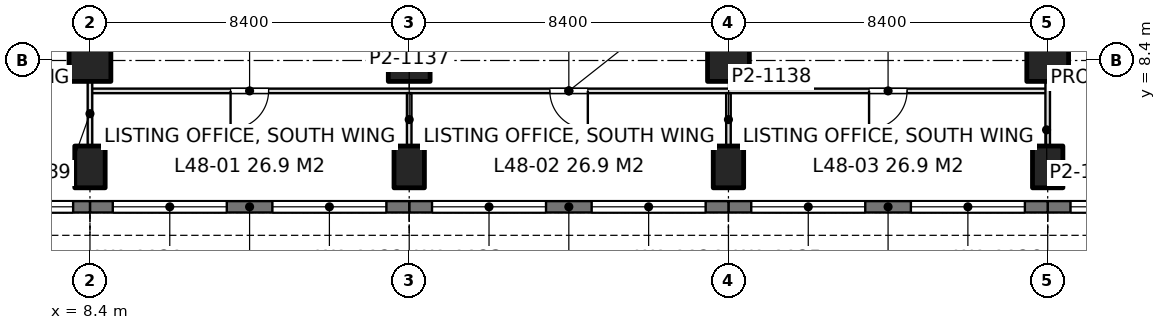
"""IFC4 building model, lengths in metres.
Left out: names, types, materials, properties, quantities, classifications, styles, units other than length and angle.
Written with IfcOpenShell. Run it as: python <this file> out.ifc"""

import sys

from ifc_helpers import new_model, si_unit, direction, frame, frame_2d, origin, origin_2d, place, context, subcontext, project, spatial, rectangle, extrude, element, fill, save


model = new_model("IFC4")
c1 = context("Model", 3, precision=1e-05, world=origin(), true_north=direction((0.0, 1.0)))
c2 = subcontext(c1, "Body", "Model", "MODEL_VIEW")
j1 = project(units=[si_unit("LENGTHUNIT", "METRE"), si_unit("PLANEANGLEUNIT", "RADIAN")], contexts=[c1])
p1 = place(None, origin())
s1 = spatial("IfcSite", under=j1, at=p1, CompositionType="ELEMENT")
p2 = place(p1, origin())
s2 = spatial("IfcBuilding", under=s1, at=p2, CompositionType="ELEMENT")
p3 = place(p2, frame((0.0, 0.0, 211.2)))
s3 = spatial("IfcBuildingStorey", under=s2, at=p3, CompositionType="ELEMENT", Elevation=211.2)
p4 = place(p3, frame((8.4, 5.6, 0.0), z_axis=(0.0, 0.0, 1.0), x_axis=(1.0, 0.0, 0.0)))
e1 = element("IfcColumn", 1, at=p4, inside=s3, PredefinedType="COLUMN", context=c2, shape_type="SweptSolid", body=[
    extrude(rectangle(XDim=0.8, YDim=1.1, at=origin_2d()), origin(), (0.0, 0.0, 1.0), 4.2),
])
p5 = place(p3, frame((8.4, 8.4, 0.0), z_axis=(0.0, 0.0, 1.0), x_axis=(1.0, 0.0, 0.0)))
e2 = element("IfcColumn", 2, at=p5, inside=s3, PredefinedType="COLUMN", context=c2, shape_type="SweptSolid", body=[
    extrude(rectangle(XDim=1.1, YDim=1.1, at=origin_2d()), origin(), (0.0, 0.0, 1.0), 4.2),
])
p6 = place(p3, frame((16.8, 5.6, 0.0), z_axis=(0.0, 0.0, 1.0), x_axis=(1.0, 0.0, 0.0)))
e3 = element("IfcColumn", 3, at=p6, inside=s3, PredefinedType="COLUMN", context=c2, shape_type="SweptSolid", body=[
    extrude(rectangle(XDim=0.8, YDim=1.1, at=origin_2d()), origin(), (0.0, 0.0, 1.0), 4.2),
])
p7 = place(p3, frame((16.8, 8.4, 0.0), z_axis=(0.0, 0.0, 1.0), x_axis=(1.0, 0.0, 0.0)))
e4 = element("IfcColumn", 4, at=p7, inside=s3, PredefinedType="COLUMN", context=c2, shape_type="SweptSolid", body=[
    extrude(rectangle(XDim=1.1, YDim=1.1, at=origin_2d()), origin(), (0.0, 0.0, 1.0), 4.2),
])
p8 = place(p3, frame((25.2, 5.6, 0.0), z_axis=(0.0, 0.0, 1.0), x_axis=(1.0, 0.0, 0.0)))
e5 = element("IfcColumn", 5, at=p8, inside=s3, PredefinedType="COLUMN", context=c2, shape_type="SweptSolid", body=[
    extrude(rectangle(XDim=0.8, YDim=1.1, at=origin_2d()), origin(), (0.0, 0.0, 1.0), 4.2),
])
p9 = place(p3, frame((25.2, 8.4, 0.0), z_axis=(0.0, 0.0, 1.0), x_axis=(1.0, 0.0, 0.0)))
e6 = element("IfcColumn", 6, at=p9, inside=s3, PredefinedType="COLUMN", context=c2, shape_type="SweptSolid", body=[
    extrude(rectangle(XDim=1.1, YDim=1.1, at=origin_2d()), origin(), (0.0, 0.0, 1.0), 4.2),
])
p10 = place(p3, frame((33.6, 5.6, 0.0), z_axis=(0.0, 0.0, 1.0), x_axis=(1.0, 0.0, 0.0)))
e7 = element("IfcColumn", 7, at=p10, inside=s3, PredefinedType="COLUMN", context=c2, shape_type="SweptSolid", body=[
    extrude(rectangle(XDim=0.8, YDim=1.1, at=origin_2d()), origin(), (0.0, 0.0, 1.0), 4.2),
])
p11 = place(p3, frame((33.6, 8.4, 0.0), z_axis=(0.0, 0.0, 1.0), x_axis=(1.0, 0.0, 0.0)))
e8 = element("IfcColumn", 8, at=p11, inside=s3, PredefinedType="COLUMN", context=c2, shape_type="SweptSolid", body=[
    extrude(rectangle(XDim=1.1, YDim=1.1, at=origin_2d()), origin(), (0.0, 0.0, 1.0), 4.2),
])
p12 = place(p3, frame((42.0, 4.55, 0.0), z_axis=(0.0, 0.0, 1.0), x_axis=(-1.0, 0.0, 0.0)))
e9 = element("IfcWall", 9, at=p12, inside=s3, PredefinedType="SOLIDWALL", context=c2, shape_type="SweptSolid", body=[
    extrude(rectangle(XDim=8.4, YDim=0.3, at=frame_2d((4.2, 0.0))), origin(), (0.0, 0.0, 1.0), 4.05),
])
p13 = place(p12, frame((0.6, 0.0, 0.9)))
e10 = element("IfcOpeningElement", 10, at=p13, cuts=e9, PredefinedType="OPENING", context=c2, shape_type="SweptSolid", body=[
    extrude(rectangle(XDim=3.0, YDim=1.9, at=frame_2d((1.5, 0.95))), frame((0.0, 0.16, 0.0), z_axis=(0.0, -1.0, 0.0), x_axis=(1.0, 0.0, 0.0)), (0.0, 0.0, 1.0), 0.32),
])
p14 = place(p12, frame((4.8, 0.0, 0.9)))
e11 = element("IfcOpeningElement", 11, at=p14, cuts=e9, PredefinedType="OPENING", context=c2, shape_type="SweptSolid", body=[
    extrude(rectangle(XDim=3.0, YDim=1.9, at=frame_2d((1.5, 0.95))), frame((0.0, 0.16, 0.0), z_axis=(0.0, -1.0, 0.0), x_axis=(1.0, 0.0, 0.0)), (0.0, 0.0, 1.0), 0.32),
])
p15 = place(p3, frame((33.6, 4.55, 0.0), z_axis=(0.0, 0.0, 1.0), x_axis=(-1.0, 0.0, 0.0)))
e12 = element("IfcWall", 12, at=p15, inside=s3, PredefinedType="SOLIDWALL", context=c2, shape_type="SweptSolid", body=[
    extrude(rectangle(XDim=8.4, YDim=0.3, at=frame_2d((4.2, 0.0))), origin(), (0.0, 0.0, 1.0), 4.05),
])
p16 = place(p15, frame((0.6, 0.0, 0.9)))
e13 = element("IfcOpeningElement", 13, at=p16, cuts=e12, PredefinedType="OPENING", context=c2, shape_type="SweptSolid", body=[
    extrude(rectangle(XDim=3.0, YDim=1.9, at=frame_2d((1.5, 0.95))), frame((0.0, 0.16, 0.0), z_axis=(0.0, -1.0, 0.0), x_axis=(1.0, 0.0, 0.0)), (0.0, 0.0, 1.0), 0.32),
])
p17 = place(p15, frame((4.8, 0.0, 0.9)))
e14 = element("IfcOpeningElement", 14, at=p17, cuts=e12, PredefinedType="OPENING", context=c2, shape_type="SweptSolid", body=[
    extrude(rectangle(XDim=3.0, YDim=1.9, at=frame_2d((1.5, 0.95))), frame((0.0, 0.16, 0.0), z_axis=(0.0, -1.0, 0.0), x_axis=(1.0, 0.0, 0.0)), (0.0, 0.0, 1.0), 0.32),
])
p18 = place(p3, frame((25.2, 4.55, 0.0), z_axis=(0.0, 0.0, 1.0), x_axis=(-1.0, 0.0, 0.0)))
e15 = element("IfcWall", 15, at=p18, inside=s3, PredefinedType="SOLIDWALL", context=c2, shape_type="SweptSolid", body=[
    extrude(rectangle(XDim=8.4, YDim=0.3, at=frame_2d((4.2, 0.0))), origin(), (0.0, 0.0, 1.0), 4.05),
])
p19 = place(p18, frame((0.6, 0.0, 0.9)))
e16 = element("IfcOpeningElement", 16, at=p19, cuts=e15, PredefinedType="OPENING", context=c2, shape_type="SweptSolid", body=[
    extrude(rectangle(XDim=3.0, YDim=1.9, at=frame_2d((1.5, 0.95))), frame((0.0, 0.16, 0.0), z_axis=(0.0, -1.0, 0.0), x_axis=(1.0, 0.0, 0.0)), (0.0, 0.0, 1.0), 0.32),
])
p20 = place(p18, frame((4.8, 0.0, 0.9)))
e17 = element("IfcOpeningElement", 17, at=p20, cuts=e15, PredefinedType="OPENING", context=c2, shape_type="SweptSolid", body=[
    extrude(rectangle(XDim=3.0, YDim=1.9, at=frame_2d((1.5, 0.95))), frame((0.0, 0.16, 0.0), z_axis=(0.0, -1.0, 0.0), x_axis=(1.0, 0.0, 0.0)), (0.0, 0.0, 1.0), 0.32),
])
p21 = place(p3, frame((16.8, 4.55, 0.0), z_axis=(0.0, 0.0, 1.0), x_axis=(-1.0, 0.0, 0.0)))
e18 = element("IfcWall", 18, at=p21, inside=s3, PredefinedType="SOLIDWALL", context=c2, shape_type="SweptSolid", body=[
    extrude(rectangle(XDim=8.4, YDim=0.3, at=frame_2d((4.2, 0.0))), origin(), (0.0, 0.0, 1.0), 4.05),
])
p22 = place(p21, frame((0.6, 0.0, 0.9)))
e19 = element("IfcOpeningElement", 19, at=p22, cuts=e18, PredefinedType="OPENING", context=c2, shape_type="SweptSolid", body=[
    extrude(rectangle(XDim=3.0, YDim=1.9, at=frame_2d((1.5, 0.95))), frame((0.0, 0.16, 0.0), z_axis=(0.0, -1.0, 0.0), x_axis=(1.0, 0.0, 0.0)), (0.0, 0.0, 1.0), 0.32),
])
p23 = place(p21, frame((4.8, 0.0, 0.9)))
e20 = element("IfcOpeningElement", 20, at=p23, cuts=e18, PredefinedType="OPENING", context=c2, shape_type="SweptSolid", body=[
    extrude(rectangle(XDim=3.0, YDim=1.9, at=frame_2d((1.5, 0.95))), frame((0.0, 0.16, 0.0), z_axis=(0.0, -1.0, 0.0), x_axis=(1.0, 0.0, 0.0)), (0.0, 0.0, 1.0), 0.32),
])
p24 = place(p3, frame((8.4, 4.55, 0.0), z_axis=(0.0, 0.0, 1.0), x_axis=(-1.0, 0.0, 0.0)))
e21 = element("IfcWall", 21, at=p24, inside=s3, PredefinedType="SOLIDWALL", context=c2, shape_type="SweptSolid", body=[
    extrude(rectangle(XDim=8.085, YDim=0.3, at=frame_2d((4.042, 0.0))), origin(), (0.0, 0.0, 1.0), 4.05),
])
p25 = place(p24, frame((0.443, 0.0, 0.9)))
e22 = element("IfcOpeningElement", 22, at=p25, cuts=e21, PredefinedType="OPENING", context=c2, shape_type="SweptSolid", body=[
    extrude(rectangle(XDim=3.0, YDim=1.9, at=frame_2d((1.5, 0.95))), frame((0.0, 0.16, 0.0), z_axis=(0.0, -1.0, 0.0), x_axis=(1.0, 0.0, 0.0)), (0.0, 0.0, 1.0), 0.32),
])
p26 = place(p24, frame((4.643, 0.0, 0.9)))
e23 = element("IfcOpeningElement", 23, at=p26, cuts=e21, PredefinedType="OPENING", context=c2, shape_type="SweptSolid", body=[
    extrude(rectangle(XDim=3.0, YDim=1.9, at=frame_2d((1.5, 0.95))), frame((0.0, 0.16, 0.0), z_axis=(0.0, -1.0, 0.0), x_axis=(1.0, 0.0, 0.0)), (0.0, 0.0, 1.0), 0.32),
])
p27 = place(p3, frame((8.4, 7.6, 0.0), z_axis=(0.0, 0.0, 1.0), x_axis=(1.0, 0.0, 0.0)))
e24 = element("IfcWall", 24, at=p27, inside=s3, PredefinedType="PARTITIONING", context=c2, shape_type="SweptSolid", body=[
    extrude(rectangle(XDim=25.2, YDim=0.12, at=frame_2d((12.6, 0.0))), origin(), (0.0, 0.0, 1.0), 3.69),
])
p28 = place(p27, frame((3.7, 0.0, 0.0)))
e25 = element("IfcOpeningElement", 25, at=p28, cuts=e24, PredefinedType="OPENING", context=c2, shape_type="SweptSolid", body=[
    extrude(rectangle(XDim=1.0, YDim=2.4, at=frame_2d((0.5, 1.2))), frame((0.0, 0.07, 0.0), z_axis=(0.0, -1.0, 0.0), x_axis=(1.0, 0.0, 0.0)), (0.0, 0.0, 1.0), 0.14),
])
p29 = place(p27, frame((12.1, 0.0, 0.0)))
e26 = element("IfcOpeningElement", 26, at=p29, cuts=e24, PredefinedType="OPENING", context=c2, shape_type="SweptSolid", body=[
    extrude(rectangle(XDim=1.0, YDim=2.4, at=frame_2d((0.5, 1.2))), frame((0.0, 0.07, 0.0), z_axis=(0.0, -1.0, 0.0), x_axis=(1.0, 0.0, 0.0)), (0.0, 0.0, 1.0), 0.14),
])
p30 = place(p27, frame((20.5, 0.0, 0.0)))
e27 = element("IfcOpeningElement", 27, at=p30, cuts=e24, PredefinedType="OPENING", context=c2, shape_type="SweptSolid", body=[
    extrude(rectangle(XDim=1.0, YDim=2.4, at=frame_2d((0.5, 1.2))), frame((0.0, 0.07, 0.0), z_axis=(0.0, -1.0, 0.0), x_axis=(1.0, 0.0, 0.0)), (0.0, 0.0, 1.0), 0.14),
])
p31 = place(p3, frame((8.4, 6.149, 0.0), z_axis=(0.0, 0.0, 1.0), x_axis=(0.0, 1.0, 0.0)))
e28 = element("IfcWall", 28, at=p31, inside=s3, PredefinedType="PARTITIONING", context=c2, shape_type="SweptSolid", body=[
    extrude(rectangle(XDim=1.703, YDim=0.12, at=frame_2d((0.852, 0.0))), origin(), (0.0, 0.0, 1.0), 3.69),
])
for number, where, z_axis, x_axis in (
    (29, (16.8, 6.149, 0.0), (0.0, 0.0, 1.0), (0.0, 1.0, 0.0)),
    (30, (25.2, 6.149, 0.0), (0.0, 0.0, 1.0), (0.0, 1.0, 0.0)),
):
    element("IfcWall", number, at=place(p3, frame(where, z_axis=z_axis, x_axis=x_axis)), inside=s3, PredefinedType="PARTITIONING", context=c2, shape_type="SweptSolid", body=[
        extrude(rectangle(XDim=1.393, YDim=0.12, at=frame_2d((0.697, 0.0))), origin(), (0.0, 0.0, 1.0), 3.69),
    ])
p32 = place(p3, frame((33.6, 6.149, 0.0), z_axis=(0.0, 0.0, 1.0), x_axis=(0.0, 1.0, 0.0)))
e31 = element("IfcWall", 31, at=p32, inside=s3, PredefinedType="PARTITIONING", context=c2, shape_type="SweptSolid", body=[
    extrude(rectangle(XDim=1.703, YDim=0.12, at=frame_2d((0.852, 0.0))), origin(), (0.0, 0.0, 1.0), 3.69),
])
p33 = place(p14, origin())
e32 = element("IfcWindow", 32, at=p33, inside=s3, PartitioningType="SINGLE_PANEL", PredefinedType="WINDOW", context=c2, shape_type="SweptSolid", body=[
    extrude(rectangle(XDim=3.0, YDim=1.9, at=frame_2d((1.5, 0.95))), frame((0.0, 0.03, 0.0), z_axis=(0.0, -1.0, 0.0), x_axis=(1.0, 0.0, 0.0)), (0.0, 0.0, 1.0), 0.06),
])
fill(e11, e32)
p34 = place(p16, origin())
e33 = element("IfcWindow", 33, at=p34, inside=s3, PartitioningType="SINGLE_PANEL", PredefinedType="WINDOW", context=c2, shape_type="SweptSolid", body=[
    extrude(rectangle(XDim=3.0, YDim=1.9, at=frame_2d((1.5, 0.95))), frame((0.0, 0.03, 0.0), z_axis=(0.0, -1.0, 0.0), x_axis=(1.0, 0.0, 0.0)), (0.0, 0.0, 1.0), 0.06),
])
fill(e13, e33)
p35 = place(p17, origin())
e34 = element("IfcWindow", 34, at=p35, inside=s3, PartitioningType="SINGLE_PANEL", PredefinedType="WINDOW", context=c2, shape_type="SweptSolid", body=[
    extrude(rectangle(XDim=3.0, YDim=1.9, at=frame_2d((1.5, 0.95))), frame((0.0, 0.03, 0.0), z_axis=(0.0, -1.0, 0.0), x_axis=(1.0, 0.0, 0.0)), (0.0, 0.0, 1.0), 0.06),
])
fill(e14, e34)
p36 = place(p19, origin())
e35 = element("IfcWindow", 35, at=p36, inside=s3, PartitioningType="SINGLE_PANEL", PredefinedType="WINDOW", context=c2, shape_type="SweptSolid", body=[
    extrude(rectangle(XDim=3.0, YDim=1.9, at=frame_2d((1.5, 0.95))), frame((0.0, 0.03, 0.0), z_axis=(0.0, -1.0, 0.0), x_axis=(1.0, 0.0, 0.0)), (0.0, 0.0, 1.0), 0.06),
])
fill(e16, e35)
p37 = place(p20, origin())
e36 = element("IfcWindow", 36, at=p37, inside=s3, PartitioningType="SINGLE_PANEL", PredefinedType="WINDOW", context=c2, shape_type="SweptSolid", body=[
    extrude(rectangle(XDim=3.0, YDim=1.9, at=frame_2d((1.5, 0.95))), frame((0.0, 0.03, 0.0), z_axis=(0.0, -1.0, 0.0), x_axis=(1.0, 0.0, 0.0)), (0.0, 0.0, 1.0), 0.06),
])
fill(e17, e36)
p38 = place(p22, origin())
e37 = element("IfcWindow", 37, at=p38, inside=s3, PartitioningType="SINGLE_PANEL", PredefinedType="WINDOW", context=c2, shape_type="SweptSolid", body=[
    extrude(rectangle(XDim=3.0, YDim=1.9, at=frame_2d((1.5, 0.95))), frame((0.0, 0.03, 0.0), z_axis=(0.0, -1.0, 0.0), x_axis=(1.0, 0.0, 0.0)), (0.0, 0.0, 1.0), 0.06),
])
fill(e19, e37)
p39 = place(p23, origin())
e38 = element("IfcWindow", 38, at=p39, inside=s3, PartitioningType="SINGLE_PANEL", PredefinedType="WINDOW", context=c2, shape_type="SweptSolid", body=[
    extrude(rectangle(XDim=3.0, YDim=1.9, at=frame_2d((1.5, 0.95))), frame((0.0, 0.03, 0.0), z_axis=(0.0, -1.0, 0.0), x_axis=(1.0, 0.0, 0.0)), (0.0, 0.0, 1.0), 0.06),
])
fill(e20, e38)
p40 = place(p25, origin())
e39 = element("IfcWindow", 39, at=p40, inside=s3, PartitioningType="SINGLE_PANEL", PredefinedType="WINDOW", context=c2, shape_type="SweptSolid", body=[
    extrude(rectangle(XDim=3.0, YDim=1.9, at=frame_2d((1.5, 0.95))), frame((0.0, 0.03, 0.0), z_axis=(0.0, -1.0, 0.0), x_axis=(1.0, 0.0, 0.0)), (0.0, 0.0, 1.0), 0.06),
])
fill(e22, e39)
p41 = place(p28, frame((1.0, 0.0, 0.0), z_axis=(0.0, 0.0, 1.0), x_axis=(-1.0, 0.0, 0.0)))
e40 = element("IfcDoor", 40, at=p41, inside=s3, OperationType="SINGLE_SWING_RIGHT", PredefinedType="DOOR", context=c2, shape_type="SweptSolid", body=[
    extrude(rectangle(XDim=1.0, YDim=2.4, at=frame_2d((0.5, 1.2))), frame((0.0, 0.025, 0.0), z_axis=(0.0, -1.0, 0.0), x_axis=(1.0, 0.0, 0.0)), (0.0, 0.0, 1.0), 0.05),
])
fill(e25, e40)
p42 = place(p29, frame((1.0, 0.0, 0.0), z_axis=(0.0, 0.0, 1.0), x_axis=(-1.0, 0.0, 0.0)))
e41 = element("IfcDoor", 41, at=p42, inside=s3, OperationType="SINGLE_SWING_LEFT", PredefinedType="DOOR", context=c2, shape_type="SweptSolid", body=[
    extrude(rectangle(XDim=1.0, YDim=2.4, at=frame_2d((0.5, 1.2))), frame((0.0, 0.025, 0.0), z_axis=(0.0, -1.0, 0.0), x_axis=(1.0, 0.0, 0.0)), (0.0, 0.0, 1.0), 0.05),
])
fill(e26, e41)
p43 = place(p30, frame((1.0, 0.0, 0.0), z_axis=(0.0, 0.0, 1.0), x_axis=(-1.0, 0.0, 0.0)))
e42 = element("IfcDoor", 42, at=p43, inside=s3, OperationType="SINGLE_SWING_RIGHT", PredefinedType="DOOR", context=c2, shape_type="SweptSolid", body=[
    extrude(rectangle(XDim=1.0, YDim=2.4, at=frame_2d((0.5, 1.2))), frame((0.0, 0.025, 0.0), z_axis=(0.0, -1.0, 0.0), x_axis=(1.0, 0.0, 0.0)), (0.0, 0.0, 1.0), 0.05),
])
fill(e27, e42)
save(model, sys.argv[1])
